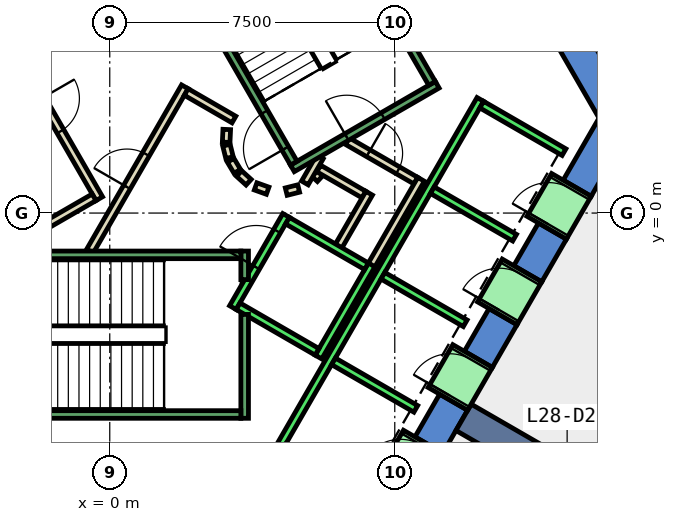
"""IFC4 building model, lengths in metres.
Left out: names, types, materials, properties, quantities, classifications, styles, units other than length and angle.
Written with IfcOpenShell. Run it as: python <this file> out.ifc"""

import sys

from ifc_helpers import new_model, si_unit, direction, frame, frame_2d, origin, place, context, subcontext, project, spatial, polyline, rectangle, outline, extrude, element, fill, save


model = new_model("IFC4")
c1 = context("Model", 3, precision=1e-05, world=origin(), true_north=direction((0.0, 1.0)))
c2 = subcontext(c1, "Body", "Model", "MODEL_VIEW")
j1 = project(units=[si_unit("LENGTHUNIT", "METRE"), si_unit("PLANEANGLEUNIT", "RADIAN")], contexts=[c1])
p1 = place(None, origin())
s1 = spatial("IfcSite", under=j1, at=p1, CompositionType="ELEMENT")
p2 = place(p1, origin())
s2 = spatial("IfcBuilding", under=s1, at=p2, CompositionType="ELEMENT")
p3 = place(p2, frame((0.0, 0.0, 128.6)))
s3 = spatial("IfcBuildingStorey", under=s2, at=p3, CompositionType="ELEMENT", Elevation=128.6)
p4 = place(p3, frame((0.0, 0.0, -0.4)))
e1 = element("IfcWall", 1, at=p4, inside=s3, PredefinedType="SHEAR", context=c2, shape_type="SweptSolid", body=[
    extrude(outline(polyline([(8.517, 11.748), (7.781, 11.323), (12.875, 2.5), (13.856, 2.5), (8.517, 11.748)])), origin(), (0.0, 0.0, 1.0), 4.0),
])
p5 = place(p3, frame((0.0, 0.0, -0.4)))
e2 = element("IfcWall", 2, at=p5, inside=s3, PredefinedType="SHEAR", context=c2, shape_type="SweptSolid", body=[
    extrude(outline(polyline([(9.417, -5.189), (8.681, -4.764), (8.031, -5.889), (8.767, -6.314), (9.417, -5.189)])), origin(), (0.0, 0.0, 1.0), 4.0),
])
p6 = place(p3, frame((0.0, 0.0, -0.4)))
e3 = element("IfcWall", 3, at=p6, inside=s3, PredefinedType="SHEAR", context=c2, shape_type="SweptSolid", body=[
    extrude(outline(polyline([(10.717, -2.937), (9.981, -2.512), (9.331, -3.638), (10.067, -4.063), (10.717, -2.937)])), origin(), (0.0, 0.0, 1.0), 4.0),
])
p7 = place(p3, frame((0.0, 0.0, -0.4)))
e4 = element("IfcWall", 4, at=p7, inside=s3, PredefinedType="SHEAR", context=c2, shape_type="SweptSolid", body=[
    extrude(outline(polyline([(12.017, -0.686), (11.281, -0.261), (10.631, -1.386), (11.367, -1.811), (12.017, -0.686)])), origin(), (0.0, 0.0, 1.0), 4.0),
])
p8 = place(p3, frame((0.0, 0.0, -0.4)))
e5 = element("IfcWall", 5, at=p8, inside=s3, PredefinedType="SHEAR", context=c2, shape_type="SweptSolid", body=[
    extrude(outline(polyline([(11.931, 0.865), (12.667, 0.44), (13.856, 2.5), (12.875, 2.5), (11.931, 0.865)])), origin(), (0.0, 0.0, 1.0), 4.0),
])
p9 = place(p3, frame((9.31, -5.375, -0.4), z_axis=(0.0, 0.0, 1.0), x_axis=(0.866017533419, -0.500013631625, 0.0)))
e6 = element("IfcWall", 6, at=p9, inside=s3, PredefinedType="SHEAR", context=c2, shape_type="SweptSolid", body=[
    extrude(rectangle(XDim=9.0, YDim=0.8, at=frame_2d((4.5, 0.0))), origin(), (0.0, 0.0, 1.0), 4.0),
])
p10 = place(p3, frame((5.39, 0.898, 0.0), z_axis=(0.0, 0.0, 1.0), x_axis=(0.673828488714, 0.738887791073, 0.0)))
e7 = element("IfcWall", 7, at=p10, inside=s3, PredefinedType="PARTITIONING", context=c2, shape_type="SweptSolid", body=[
    extrude(rectangle(XDim=0.263, YDim=0.2, at=frame_2d((0.131, 0.0))), origin(), (0.0, 0.0, 1.0), 3.6),
])
p11 = place(p3, frame((5.499, 1.172, 0.0), z_axis=(0.0, 0.0, 1.0), x_axis=(0.866333505267, -0.499465972466, 0.0)))
e8 = element("IfcWall", 8, at=p11, inside=s3, PredefinedType="PARTITIONING", context=c2, shape_type="SweptSolid", body=[
    extrude(rectangle(XDim=1.374, YDim=0.2, at=frame_2d((0.687, 0.0))), origin(), (0.0, 0.0, 1.0), 3.6),
])
p12 = place(p3, frame((6.826, 0.522, 0.0), z_axis=(0.0, 0.0, 1.0), x_axis=(-0.500016722714, -0.866015748706, 0.0)))
e9 = element("IfcWall", 9, at=p12, inside=s3, PredefinedType="PARTITIONING", context=c2, shape_type="SweptSolid", body=[
    extrude(rectangle(XDim=1.7, YDim=0.2, at=frame_2d((0.85, 0.0))), origin(), (0.0, 0.0, 1.0), 3.6),
])
p13 = place(p3, frame((6.25, 1.894, 0.0), z_axis=(0.0, 0.0, 1.0), x_axis=(0.866043184279, -0.499969202016, 0.0)))
e10 = element("IfcWall", 10, at=p13, inside=s3, PredefinedType="PARTITIONING", context=c2, shape_type="SweptSolid", body=[
    extrude(rectangle(XDim=2.084, YDim=0.2, at=frame_2d((1.042, 0.0))), origin(), (0.0, 0.0, 1.0), 3.6),
])
p14 = place(p13, frame((0.642, 0.0, 0.0)))
e11 = element("IfcOpeningElement", 11, at=p14, cuts=e10, PredefinedType="OPENING", context=c2, shape_type="SweptSolid", body=[
    extrude(rectangle(XDim=0.9, YDim=2.1, at=frame_2d((0.45, 1.05))), frame((0.0, 0.11, 0.0), z_axis=(0.0, -1.0, 0.0), x_axis=(1.0, 0.0, 0.0)), (0.0, 0.0, 1.0), 0.22),
])
p15 = place(p3, frame((8.192, 0.888, 0.0), z_axis=(0.0, 0.0, 1.0), x_axis=(-0.499940625693, -0.866059680843, 0.0)))
e12 = element("IfcWall", 12, at=p15, inside=s3, PredefinedType="PARTITIONING", context=c2, shape_type="SweptSolid", body=[
    extrude(rectangle(XDim=2.68, YDim=0.2, at=frame_2d((1.34, 0.0))), origin(), (0.0, 0.0, 1.0), 3.6),
])
p16 = place(p3, frame((5.135, 0.793, 0.0), z_axis=(0.0, 0.0, 1.0), x_axis=(0.499526442893, 0.866298639529, 0.0)))
e13 = element("IfcWall", 13, at=p16, inside=s3, PredefinedType="PARTITIONING", context=c2, shape_type="SweptSolid", body=[
    extrude(rectangle(XDim=0.791, YDim=0.2, at=frame_2d((0.396, 0.0))), origin(), (0.0, 0.0, 1.0), 3.6),
])
p17 = place(p3, frame((-0.52, -1.0, 0.0), z_axis=(0.0, 0.0, 1.0), x_axis=(0.50011622646, 0.865958290007, 0.0)))
e14 = element("IfcWall", 14, at=p17, inside=s3, PredefinedType="PARTITIONING", context=c2, shape_type="SweptSolid", body=[
    extrude(rectangle(XDim=4.991, YDim=0.2, at=frame_2d((2.496, 0.0))), origin(), (0.0, 0.0, 1.0), 3.6),
])
p18 = place(p17, frame((1.945, 0.0, 0.0)))
e15 = element("IfcOpeningElement", 15, at=p18, cuts=e14, PredefinedType="OPENING", context=c2, shape_type="SweptSolid", body=[
    extrude(rectangle(XDim=1.0, YDim=2.1, at=frame_2d((0.5, 1.05))), frame((0.0, 0.11, 0.0), z_axis=(0.0, -1.0, 0.0), x_axis=(1.0, 0.0, 0.0)), (0.0, 0.0, 1.0), 0.22),
])
p19 = place(p3, frame((2.012, 3.186, 0.0), z_axis=(0.0, 0.0, 1.0), x_axis=(0.865891012941, -0.500232699559, 0.0)))
e16 = element("IfcWall", 16, at=p19, inside=s3, PredefinedType="PARTITIONING", context=c2, shape_type="SweptSolid", body=[
    extrude(rectangle(XDim=1.449, YDim=0.2, at=frame_2d((0.725, 0.0))), origin(), (0.0, 0.0, 1.0), 3.6),
])
p20 = place(p3, frame((3.079, 2.199, 0.0), z_axis=(0.0, 0.0, 1.0), x_axis=(-0.047771483479, -0.998858290933, 0.0)))
e17 = element("IfcWall", 17, at=p20, inside=s3, PredefinedType="PARTITIONING", context=c2, shape_type="SweptSolid", body=[
    extrude(rectangle(XDim=0.337, YDim=0.2, at=frame_2d((0.169, 0.0))), origin(), (0.0, 0.0, 1.0), 3.6),
])
p21 = place(p3, frame((3.07, 1.786, 0.0), z_axis=(0.0, 0.0, 1.0), x_axis=(0.242705583207, -0.970099994784, 0.0)))
e18 = element("IfcWall", 18, at=p21, inside=s3, PredefinedType="PARTITIONING", context=c2, shape_type="SweptSolid", body=[
    extrude(rectangle(XDim=0.338, YDim=0.2, at=frame_2d((0.169, 0.0))), origin(), (0.0, 0.0, 1.0), 3.6),
])
for number, where, z_axis, x_axis in (
    (19, (3.182, 1.388, 0.0), (0.0, 0.0, 1.0), (0.512, -0.859, 0.0)),
    (20, (3.404, 1.039, 0.0), (0.0, 0.0, 1.0), (0.74, -0.672, 0.0)),
):
    element("IfcWall", number, at=place(p3, frame(where, z_axis=z_axis, x_axis=x_axis)), inside=s3, PredefinedType="PARTITIONING", context=c2, shape_type="SweptSolid", body=[
        extrude(rectangle(XDim=0.338, YDim=0.2, at=frame_2d((0.169, 0.0))), origin(), (0.0, 0.0, 1.0), 3.6),
    ])
p22 = place(p3, frame((3.838, 0.702, 0.0), z_axis=(0.0, 0.0, 1.0), x_axis=(0.941035081519, -0.338308993895, 0.0)))
e21 = element("IfcWall", 21, at=p22, inside=s3, PredefinedType="PARTITIONING", context=c2, shape_type="SweptSolid", body=[
    extrude(rectangle(XDim=0.337, YDim=0.2, at=frame_2d((0.168, 0.0))), origin(), (0.0, 0.0, 1.0), 3.6),
])
p23 = place(p3, frame((4.644, 0.564, 0.0), z_axis=(0.0, 0.0, 1.0), x_axis=(0.969929076366, 0.243387729394, 0.0)))
e22 = element("IfcWall", 22, at=p23, inside=s3, PredefinedType="PARTITIONING", context=c2, shape_type="SweptSolid", body=[
    extrude(rectangle(XDim=0.337, YDim=0.2, at=frame_2d((0.168, 0.0))), origin(), (0.0, 0.0, 1.0), 3.6),
])
p24 = place(p3, frame((-2.771, 4.7, 0.0), z_axis=(0.0, 0.0, 1.0), x_axis=(0.499969479948, -0.866043023828, 0.0)))
e23 = element("IfcWall", 23, at=p24, inside=s3, PredefinedType="PARTITIONING", context=c2, shape_type="SweptSolid", body=[
    extrude(rectangle(XDim=4.99, YDim=0.2, at=frame_2d((2.495, 0.0))), origin(), (0.0, 0.0, 1.0), 3.6),
])
p25 = place(p24, frame((1.945, 0.0, 0.0)))
e24 = element("IfcOpeningElement", 24, at=p25, cuts=e23, PredefinedType="OPENING", context=c2, shape_type="SweptSolid", body=[
    extrude(rectangle(XDim=1.0, YDim=2.1, at=frame_2d((0.5, 1.05))), frame((0.0, 0.11, 0.0), z_axis=(0.0, -1.0, 0.0), x_axis=(1.0, 0.0, 0.0)), (0.0, 0.0, 1.0), 0.22),
])
p26 = place(p3, frame((-0.412, 0.414, 0.0), z_axis=(0.0, 0.0, 1.0), x_axis=(-0.866017369001, -0.500013916395, 0.0)))
e25 = element("IfcWall", 25, at=p26, inside=s3, PredefinedType="PARTITIONING", context=c2, shape_type="SweptSolid", body=[
    extrude(rectangle(XDim=1.45, YDim=0.2, at=frame_2d((0.725, 0.0))), origin(), (0.0, 0.0, 1.0), 3.6),
])
p27 = place(p3, frame((16.32, -0.832, 0.0), z_axis=(0.0, 0.0, 1.0), x_axis=(-0.499951642806, -0.866053321023, 0.0)))
e26 = element("IfcWall", 26, at=p27, inside=s3, PredefinedType="PARTITIONING", context=c2, shape_type="SweptSolid", body=[
    extrude(rectangle(XDim=7.039, YDim=0.2, at=frame_2d((3.52, 0.0))), origin(), (0.0, 0.0, 1.0), 3.6),
])
p28 = place(p3, frame((3.24, -2.488, 0.0), z_axis=(0.0, 0.0, 1.0), x_axis=(0.49994636267, 0.866056369097, 0.0)))
e27 = element("IfcWall", 27, at=p28, inside=s3, PredefinedType="STANDARD", context=c2, shape_type="SweptSolid", body=[
    extrude(rectangle(XDim=2.8, YDim=0.2, at=frame_2d((1.4, 0.0))), origin(), (0.0, 0.0, 1.0), 3.6),
])
p29 = place(p28, frame((1.225, 0.0, 0.0)))
e28 = element("IfcOpeningElement", 28, at=p29, cuts=e27, PredefinedType="OPENING", context=c2, shape_type="SweptSolid", body=[
    extrude(rectangle(XDim=1.1, YDim=2.1, at=frame_2d((0.55, 1.05))), frame((0.0, 0.11, 0.0), z_axis=(0.0, -1.0, 0.0), x_axis=(1.0, 0.0, 0.0)), (0.0, 0.0, 1.0), 0.22),
])
p30 = place(p3, frame((5.492, -3.788, 0.0), z_axis=(0.0, 0.0, 1.0), x_axis=(0.500011755427, 0.866018616679, 0.0)))
e29 = element("IfcWall", 29, at=p30, inside=s3, PredefinedType="STANDARD", context=c2, shape_type="SweptSolid", body=[
    extrude(rectangle(XDim=2.8, YDim=0.2, at=frame_2d((1.4, 0.0))), origin(), (0.0, 0.0, 1.0), 3.6),
])
p31 = place(p3, frame((3.377, -2.452, 0.0), z_axis=(0.0, 0.0, 1.0), x_axis=(0.865955154139, -0.50012165622, 0.0)))
e30 = element("IfcWall", 30, at=p31, inside=s3, PredefinedType="STANDARD", context=c2, shape_type="SweptSolid", body=[
    extrude(rectangle(XDim=2.4, YDim=0.2, at=frame_2d((1.2, 0.0))), origin(), (0.0, 0.0, 1.0), 3.6),
])
p32 = place(p3, frame((4.677, -0.2, 0.0), z_axis=(0.0, 0.0, 1.0), x_axis=(0.865973769406, -0.500089422704, 0.0)))
e31 = element("IfcWall", 31, at=p32, inside=s3, PredefinedType="STANDARD", context=c2, shape_type="SweptSolid", body=[
    extrude(rectangle(XDim=2.399, YDim=0.2, at=frame_2d((1.2, 0.0))), origin(), (0.0, 0.0, 1.0), 3.6),
])
p33 = place(p3, frame((4.451, -6.19, 0.0), z_axis=(0.0, 0.0, 1.0), x_axis=(0.50000090737, 0.866024879913, 0.0)))
e32 = element("IfcWall", 32, at=p33, inside=s3, PredefinedType="STANDARD", context=c2, shape_type="SweptSolid", body=[
    extrude(rectangle(XDim=10.6, YDim=0.2, at=frame_2d((5.3, 0.0))), origin(), (0.0, 0.0, 1.0), 3.6),
])
for number, where, z_axis, x_axis in (
    (33, (5.888, -3.902, 0.0), (0.0, 0.0, 1.0), (0.866, -0.5, 0.0)),
    (34, (7.188, -1.65, 0.0), (0.0, 0.0, 1.0), (0.866, -0.5, 0.0)),
    (35, (8.488, 0.602, 0.0), (0.0, 0.0, 1.0), (0.866, -0.5, 0.0)),
):
    element("IfcWall", number, at=place(p3, frame(where, z_axis=z_axis, x_axis=x_axis)), inside=s3, PredefinedType="STANDARD", context=c2, shape_type="SweptSolid", body=[
        extrude(rectangle(XDim=2.5, YDim=0.2, at=frame_2d((1.25, 0.0))), origin(), (0.0, 0.0, 1.0), 3.6),
    ])
p34 = place(p3, frame((9.788, 2.853, 0.0), z_axis=(0.0, 0.0, 1.0), x_axis=(0.865998541277, -0.500046524342, 0.0)))
e36 = element("IfcWall", 36, at=p34, inside=s3, PredefinedType="STANDARD", context=c2, shape_type="SweptSolid", body=[
    extrude(rectangle(XDim=2.5, YDim=0.2, at=frame_2d((1.25, 0.0))), origin(), (0.0, 0.0, 1.0), 3.6),
])
p35 = place(p3, frame((7.598, -7.14, 0.0), z_axis=(0.0, 0.0, 1.0), x_axis=(0.500362116554, 0.865816234728, 0.0)))
e37 = element("IfcWall", 37, at=p35, inside=s3, PredefinedType="STANDARD", context=c2, shape_type="SweptSolid", body=[
    extrude(rectangle(XDim=1.299, YDim=1.2, at=frame_2d((0.65, 0.0))), origin(), (0.0, 0.0, 1.0), 2.4),
])
p36 = place(p35, frame((0.1, 0.0, 0.0)))
e38 = element("IfcOpeningElement", 38, at=p36, cuts=e37, PredefinedType="OPENING", context=c2, shape_type="SweptSolid", body=[
    extrude(rectangle(XDim=1.1, YDim=2.3, at=frame_2d((0.55, 1.15))), frame((0.0, 0.61, 0.0), z_axis=(0.0, -1.0, 0.0), x_axis=(1.0, 0.0, 0.0)), (0.0, 0.0, 1.0), 1.22),
])
p37 = place(p3, frame((8.898, -4.889, 0.0), z_axis=(0.0, 0.0, 1.0), x_axis=(0.500036693733, 0.866004217611, 0.0)))
e39 = element("IfcWall", 39, at=p37, inside=s3, PredefinedType="STANDARD", context=c2, shape_type="SweptSolid", body=[
    extrude(rectangle(XDim=1.3, YDim=1.2, at=frame_2d((0.65, 0.0))), origin(), (0.0, 0.0, 1.0), 2.4),
])
p38 = place(p37, frame((0.1, 0.0, 0.0)))
e40 = element("IfcOpeningElement", 40, at=p38, cuts=e39, PredefinedType="OPENING", context=c2, shape_type="SweptSolid", body=[
    extrude(rectangle(XDim=1.1, YDim=2.3, at=frame_2d((0.55, 1.15))), frame((0.0, 0.61, 0.0), z_axis=(0.0, -1.0, 0.0), x_axis=(1.0, 0.0, 0.0)), (0.0, 0.0, 1.0), 1.22),
])
p39 = place(p3, frame((10.198, -2.637, 0.0), z_axis=(0.0, 0.0, 1.0), x_axis=(0.49989585183, 0.866085525409, 0.0)))
e41 = element("IfcWall", 41, at=p39, inside=s3, PredefinedType="STANDARD", context=c2, shape_type="SweptSolid", body=[
    extrude(rectangle(XDim=1.3, YDim=1.2, at=frame_2d((0.65, 0.0))), origin(), (0.0, 0.0, 1.0), 2.4),
])
p40 = place(p39, frame((0.1, 0.0, 0.0)))
e42 = element("IfcOpeningElement", 42, at=p40, cuts=e41, PredefinedType="OPENING", context=c2, shape_type="SweptSolid", body=[
    extrude(rectangle(XDim=1.1, YDim=2.3, at=frame_2d((0.55, 1.15))), frame((0.0, 0.61, 0.0), z_axis=(0.0, -1.0, 0.0), x_axis=(1.0, 0.0, 0.0)), (0.0, 0.0, 1.0), 1.22),
])
p41 = place(p3, frame((11.498, -0.385, 0.0), z_axis=(0.0, 0.0, 1.0), x_axis=(0.500221244143, 0.865897630733, 0.0)))
e43 = element("IfcWall", 43, at=p41, inside=s3, PredefinedType="STANDARD", context=c2, shape_type="SweptSolid", body=[
    extrude(rectangle(XDim=1.299, YDim=1.2, at=frame_2d((0.65, 0.0))), origin(), (0.0, 0.0, 1.0), 2.4),
])
p42 = place(p41, frame((0.1, 0.0, 0.0)))
e44 = element("IfcOpeningElement", 44, at=p42, cuts=e43, PredefinedType="OPENING", context=c2, shape_type="SweptSolid", body=[
    extrude(rectangle(XDim=1.1, YDim=2.3, at=frame_2d((0.55, 1.15))), frame((0.0, 0.61, 0.0), z_axis=(0.0, -1.0, 0.0), x_axis=(1.0, 0.0, 0.0)), (0.0, 0.0, 1.0), 1.22),
])
p43 = place(p3, frame((3.55, -2.667, 0.0), z_axis=(0.0, 0.0, 1.0), x_axis=(0.0, -1.0, 0.0)))
e45 = element("IfcWall", 45, at=p43, inside=s3, PredefinedType="STANDARD", context=c2, shape_type="SweptSolid", body=[
    extrude(rectangle(XDim=2.733, YDim=0.2, at=frame_2d((1.366, 0.0))), origin(), (0.0, 0.0, 1.0), 3.6),
])
p44 = place(p3, frame((3.55, -1.0, 0.0), z_axis=(0.0, 0.0, 1.0), x_axis=(0.0, -1.0, 0.0)))
e46 = element("IfcWall", 46, at=p44, inside=s3, PredefinedType="STANDARD", context=c2, shape_type="SweptSolid", body=[
    extrude(rectangle(XDim=0.751, YDim=0.2, at=frame_2d((0.375, 0.0))), origin(), (0.0, 0.0, 1.0), 3.6),
])
p45 = place(p3, frame((-3.45, -1.1, 0.0), z_axis=(0.0, 0.0, 1.0), x_axis=(1.0, 0.0, 0.0)))
e47 = element("IfcWall", 47, at=p45, inside=s3, PredefinedType="STANDARD", context=c2, shape_type="SweptSolid", body=[
    extrude(rectangle(XDim=6.9, YDim=0.2, at=frame_2d((3.45, 0.0))), origin(), (0.0, 0.0, 1.0), 3.6),
])
p46 = place(p45, frame((0.45, 0.0, 0.0)))
e48 = element("IfcOpeningElement", 48, at=p46, cuts=e47, PredefinedType="OPENING", context=c2, shape_type="SweptSolid", body=[
    extrude(rectangle(XDim=1.1, YDim=2.2, at=frame_2d((0.55, 1.1))), frame((0.0, 0.11, 0.0), z_axis=(0.0, -1.0, 0.0), x_axis=(1.0, 0.0, 0.0)), (0.0, 0.0, 1.0), 0.22),
])
p47 = place(p3, frame((-3.45, -5.3, 0.0), z_axis=(0.0, 0.0, 1.0), x_axis=(1.0, 0.0, 0.0)))
e49 = element("IfcWall", 49, at=p47, inside=s3, PredefinedType="STANDARD", context=c2, shape_type="SweptSolid", body=[
    extrude(rectangle(XDim=6.9, YDim=0.2, at=frame_2d((3.45, 0.0))), origin(), (0.0, 0.0, 1.0), 3.6),
])
p48 = place(p3, frame((4.806, 1.176, 0.0), z_axis=(0.0, 0.0, 1.0), x_axis=(0.866059941101, 0.499940174841, 0.0)))
e50 = element("IfcWall", 50, at=p48, inside=s3, PredefinedType="STANDARD", context=c2, shape_type="SweptSolid", body=[
    extrude(rectangle(XDim=4.4, YDim=0.2, at=frame_2d((2.2, 0.0))), origin(), (0.0, 0.0, 1.0), 3.6),
])
p49 = place(p48, frame((1.65, 0.0, 0.0)))
e51 = element("IfcOpeningElement", 51, at=p49, cuts=e50, PredefinedType="OPENING", context=c2, shape_type="SweptSolid", body=[
    extrude(rectangle(XDim=1.1, YDim=2.2, at=frame_2d((0.55, 1.1))), frame((0.0, 0.11, 0.0), z_axis=(0.0, -1.0, 0.0), x_axis=(1.0, 0.0, 0.0)), (0.0, 0.0, 1.0), 0.22),
])
p50 = place(p3, frame((4.843, 1.312, 0.0), z_axis=(0.0, 0.0, 1.0), x_axis=(-0.499963383562, 0.866046543262, 0.0)))
e52 = element("IfcWall", 52, at=p50, inside=s3, PredefinedType="STANDARD", context=c2, shape_type="SweptSolid", body=[
    extrude(rectangle(XDim=6.9, YDim=0.2, at=frame_2d((3.45, 0.0))), origin(), (0.0, 0.0, 1.0), 3.6),
])
p51 = place(p50, frame((0.45, 0.0, 0.0)))
e53 = element("IfcOpeningElement", 53, at=p51, cuts=e52, PredefinedType="OPENING", context=c2, shape_type="SweptSolid", body=[
    extrude(rectangle(XDim=1.1, YDim=2.2, at=frame_2d((0.55, 1.1))), frame((0.0, 0.11, 0.0), z_axis=(0.0, -1.0, 0.0), x_axis=(1.0, 0.0, 0.0)), (0.0, 0.0, 1.0), 0.22),
])
p52 = place(p3, frame((8.48, 3.412, 0.0), z_axis=(0.0, 0.0, 1.0), x_axis=(-0.499978703459, 0.866037698999, 0.0)))
e54 = element("IfcWall", 54, at=p52, inside=s3, PredefinedType="STANDARD", context=c2, shape_type="SweptSolid", body=[
    extrude(rectangle(XDim=6.9, YDim=0.2, at=frame_2d((3.45, 0.0))), origin(), (0.0, 0.0, 1.0), 3.6),
])
p53 = place(p3, frame((-1.393, 7.288, 0.0), z_axis=(0.0, 0.0, 1.0), x_axis=(-0.499963383562, -0.866046543262, 0.0)))
e55 = element("IfcWall", 55, at=p53, inside=s3, PredefinedType="STANDARD", context=c2, shape_type="SweptSolid", body=[
    extrude(rectangle(XDim=6.9, YDim=0.2, at=frame_2d((3.45, 0.0))), origin(), (0.0, 0.0, 1.0), 3.6),
])
p54 = place(p53, frame((0.45, 0.0, 0.0)))
e56 = element("IfcOpeningElement", 56, at=p54, cuts=e55, PredefinedType="OPENING", context=c2, shape_type="SweptSolid", body=[
    extrude(rectangle(XDim=1.1, YDim=2.2, at=frame_2d((0.55, 1.1))), frame((0.0, 0.11, 0.0), z_axis=(0.0, -1.0, 0.0), x_axis=(1.0, 0.0, 0.0)), (0.0, 0.0, 1.0), 0.22),
])
p55 = place(p18, origin())
e57 = element("IfcDoor", 57, at=p55, inside=s3, OperationType="SINGLE_SWING_LEFT", PredefinedType="DOOR", context=c2, shape_type="SweptSolid", body=[
    extrude(rectangle(XDim=1.0, YDim=2.1, at=frame_2d((0.5, 1.05))), frame((0.0, 0.025, 0.0), z_axis=(0.0, -1.0, 0.0), x_axis=(1.0, 0.0, 0.0)), (0.0, 0.0, 1.0), 0.05),
])
fill(e15, e57)
p56 = place(p25, origin())
e58 = element("IfcDoor", 58, at=p56, inside=s3, OperationType="SINGLE_SWING_RIGHT", PredefinedType="DOOR", context=c2, shape_type="SweptSolid", body=[
    extrude(rectangle(XDim=1.0, YDim=2.1, at=frame_2d((0.5, 1.05))), frame((0.0, 0.025, 0.0), z_axis=(0.0, -1.0, 0.0), x_axis=(1.0, 0.0, 0.0)), (0.0, 0.0, 1.0), 0.05),
])
fill(e24, e58)
p57 = place(p14, origin())
e59 = element("IfcDoor", 59, at=p57, inside=s3, OperationType="SINGLE_SWING_LEFT", PredefinedType="DOOR", context=c2, shape_type="SweptSolid", body=[
    extrude(rectangle(XDim=0.9, YDim=2.1, at=frame_2d((0.45, 1.05))), frame((0.0, 0.025, 0.0), z_axis=(0.0, -1.0, 0.0), x_axis=(1.0, 0.0, 0.0)), (0.0, 0.0, 1.0), 0.05),
])
fill(e11, e59)
p58 = place(p38, origin())
e60 = element("IfcDoor", 60, at=p58, inside=s3, OperationType="SLIDING_TO_LEFT", PredefinedType="DOOR", context=c2, shape_type="SweptSolid", body=[
    extrude(rectangle(XDim=1.1, YDim=2.3, at=frame_2d((0.55, 1.15))), frame((0.0, 0.025, 0.0), z_axis=(0.0, -1.0, 0.0), x_axis=(1.0, 0.0, 0.0)), (0.0, 0.0, 1.0), 0.05),
])
fill(e40, e60)
p59 = place(p40, origin())
e61 = element("IfcDoor", 61, at=p59, inside=s3, OperationType="SLIDING_TO_LEFT", PredefinedType="DOOR", context=c2, shape_type="SweptSolid", body=[
    extrude(rectangle(XDim=1.1, YDim=2.3, at=frame_2d((0.55, 1.15))), frame((0.0, 0.025, 0.0), z_axis=(0.0, -1.0, 0.0), x_axis=(1.0, 0.0, 0.0)), (0.0, 0.0, 1.0), 0.05),
])
fill(e42, e61)
p60 = place(p42, origin())
e62 = element("IfcDoor", 62, at=p60, inside=s3, OperationType="SLIDING_TO_LEFT", PredefinedType="DOOR", context=c2, shape_type="SweptSolid", body=[
    extrude(rectangle(XDim=1.1, YDim=2.3, at=frame_2d((0.55, 1.15))), frame((0.0, 0.025, 0.0), z_axis=(0.0, -1.0, 0.0), x_axis=(1.0, 0.0, 0.0)), (0.0, 0.0, 1.0), 0.05),
])
fill(e44, e62)
p61 = place(p29, origin())
e63 = element("IfcDoor", 63, at=p61, inside=s3, OperationType="SLIDING_TO_LEFT", PredefinedType="DOOR", context=c2, shape_type="SweptSolid", body=[
    extrude(rectangle(XDim=1.1, YDim=2.1, at=frame_2d((0.55, 1.05))), frame((0.0, 0.025, 0.0), z_axis=(0.0, -1.0, 0.0), x_axis=(1.0, 0.0, 0.0)), (0.0, 0.0, 1.0), 0.05),
])
fill(e28, e63)
p62 = place(p51, origin())
e64 = element("IfcDoor", 64, at=p62, inside=s3, OperationType="SINGLE_SWING_LEFT", PredefinedType="DOOR", context=c2, shape_type="SweptSolid", body=[
    extrude(rectangle(XDim=1.1, YDim=2.2, at=frame_2d((0.55, 1.1))), frame((0.0, 0.025, 0.0), z_axis=(0.0, -1.0, 0.0), x_axis=(1.0, 0.0, 0.0)), (0.0, 0.0, 1.0), 0.05),
])
fill(e53, e64)
p63 = place(p49, origin())
e65 = element("IfcDoor", 65, at=p63, inside=s3, OperationType="SINGLE_SWING_LEFT", PredefinedType="DOOR", context=c2, shape_type="SweptSolid", body=[
    extrude(rectangle(XDim=1.1, YDim=2.2, at=frame_2d((0.55, 1.1))), frame((0.0, 0.025, 0.0), z_axis=(0.0, -1.0, 0.0), x_axis=(1.0, 0.0, 0.0)), (0.0, 0.0, 1.0), 0.05),
])
fill(e51, e65)
save(model, sys.argv[1])
